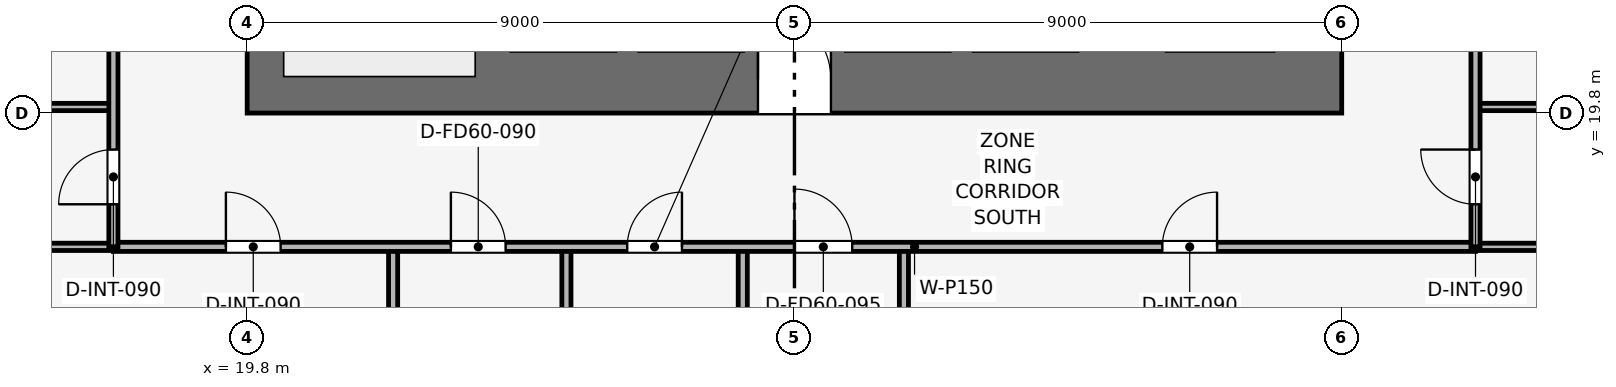
"""IFC4 building model, lengths in metres.
Left out: names, types, materials, properties, quantities, classifications, styles, units other than length and angle.
Written with IfcOpenShell. Run it as: python <this file> out.ifc"""

import sys

from ifc_helpers import new_model, si_unit, direction, frame, frame_2d, origin, place, context, subcontext, project, spatial, rectangle, extrude, element, fill, save


model = new_model("IFC4")
c1 = context("Model", 3, precision=1e-05, world=origin(), true_north=direction((0.0, 1.0)))
c2 = subcontext(c1, "Body", "Model", "MODEL_VIEW")
j1 = project(units=[si_unit("LENGTHUNIT", "METRE"), si_unit("PLANEANGLEUNIT", "RADIAN")], contexts=[c1])
p1 = place(None, origin())
s1 = spatial("IfcSite", under=j1, at=p1, CompositionType="ELEMENT")
p2 = place(p1, origin())
s2 = spatial("IfcBuilding", under=s1, at=p2, CompositionType="ELEMENT")
p3 = place(p2, frame((0.0, 0.0, 65.1)))
s3 = spatial("IfcBuildingStorey", under=s2, at=p3, CompositionType="ELEMENT", Elevation=65.1)
p4 = place(p3, frame((19.8, 20.35, 0.0), z_axis=(0.0, 0.0, 1.0), x_axis=(1.0, 0.0, 0.0)))
e1 = element("IfcWall", 1, at=p4, inside=s3, PredefinedType="SHEAR", context=c2, shape_type="SweptSolid", body=[
    extrude(rectangle(XDim=18.0, YDim=1.1, at=frame_2d((9.0, 0.0))), origin(), (0.0, 0.0, 1.0), 3.9),
])
p5 = place(p4, frame((8.4, 0.0, 0.0)))
e2 = element("IfcOpeningElement", 2, at=p5, cuts=e1, PredefinedType="OPENING", context=c2, shape_type="SweptSolid", body=[
    extrude(rectangle(XDim=1.2, YDim=2.2, at=frame_2d((0.6, 1.1))), frame((0.0, 0.56, 0.0), z_axis=(0.0, -1.0, 0.0), x_axis=(1.0, 0.0, 0.0)), (0.0, 0.0, 1.0), 1.12),
])
p6 = place(p3, frame((22.2, 1.03, 0.0), z_axis=(0.0, 0.0, 1.0), x_axis=(0.0, 1.0, 0.0)))
e3 = element("IfcWall", 3, at=p6, inside=s3, PredefinedType="PARTITIONING", context=c2, shape_type="SweptSolid", body=[
    extrude(rectangle(XDim=16.57, YDim=0.15, at=frame_2d((8.285, 0.0))), origin(), (0.0, 0.0, 1.0), 2.935),
])
p7 = place(p6, frame((6.235, 0.0, 0.0)))
e4 = element("IfcOpeningElement", 4, at=p7, cuts=e3, PredefinedType="OPENING", context=c2, shape_type="SweptSolid", body=[
    extrude(rectangle(XDim=0.9, YDim=2.1, at=frame_2d((0.45, 1.05))), frame((0.0, 0.085, 0.0), z_axis=(0.0, -1.0, 0.0), x_axis=(1.0, 0.0, 0.0)), (0.0, 0.0, 1.0), 0.17),
])
p8 = place(p3, frame((30.6, 1.03, 0.0), z_axis=(0.0, 0.0, 1.0), x_axis=(0.0, 1.0, 0.0)))
e5 = element("IfcWall", 5, at=p8, inside=s3, PredefinedType="PARTITIONING", context=c2, shape_type="SweptSolid", body=[
    extrude(rectangle(XDim=16.57, YDim=0.15, at=frame_2d((8.285, 0.0))), origin(), (0.0, 0.0, 1.0), 2.935),
])
for number, where, z_axis, x_axis in (
    (6, (25.05, 14.4, 0.0), (0.0, 0.0, 1.0), (0.0, 1.0, 0.0)),
    (7, (27.95, 14.4, 0.0), (0.0, 0.0, 1.0), (0.0, 1.0, 0.0)),
):
    element("IfcWall", number, at=place(p3, frame(where, z_axis=z_axis, x_axis=x_axis)), inside=s3, PredefinedType="PARTITIONING", context=c2, shape_type="SweptSolid", body=[
        extrude(rectangle(XDim=3.2, YDim=0.15, at=frame_2d((1.6, 0.0))), origin(), (0.0, 0.0, 1.0), 3.65),
    ])
for number, where, z_axis, x_axis in (
    (8, (1.03, 17.6, 0.0), (0.0, 0.0, 1.0), (1.0, 0.0, 0.0)),
    (9, (40.0, 17.6, 0.0), (0.0, 0.0, 1.0), (1.0, 0.0, 0.0)),
    (10, (1.03, 19.9, 0.0), (0.0, 0.0, 1.0), (1.0, 0.0, 0.0)),
    (11, (40.0, 19.9, 0.0), (0.0, 0.0, 1.0), (1.0, 0.0, 0.0)),
):
    element("IfcWall", number, at=place(p3, frame(where, z_axis=z_axis, x_axis=x_axis)), inside=s3, PredefinedType="PARTITIONING", context=c2, shape_type="SweptSolid", body=[
        extrude(rectangle(XDim=16.57, YDim=0.12, at=frame_2d((8.285, 0.0))), origin(), (0.0, 0.0, 1.0), 2.935),
    ])
p9 = place(p3, frame((17.6, 17.6, 0.0), z_axis=(0.0, 0.0, 1.0), x_axis=(1.0, 0.0, 0.0)))
e12 = element("IfcWall", 12, at=p9, inside=s3, PredefinedType="PARTITIONING", context=c2, shape_type="SweptSolid", body=[
    extrude(rectangle(XDim=22.4, YDim=0.15, at=frame_2d((11.2, 0.0))), origin(), (0.0, 0.0, 1.0), 3.085),
])
p10 = place(p9, frame((1.85, 0.0, 0.0)))
e13 = element("IfcOpeningElement", 13, at=p10, cuts=e12, PredefinedType="OPENING", context=c2, shape_type="SweptSolid", body=[
    extrude(rectangle(XDim=0.9, YDim=2.1, at=frame_2d((0.45, 1.05))), frame((0.0, 0.085, 0.0), z_axis=(0.0, -1.0, 0.0), x_axis=(1.0, 0.0, 0.0)), (0.0, 0.0, 1.0), 0.17),
])
p11 = place(p9, frame((5.55, 0.0, 0.0)))
e14 = element("IfcOpeningElement", 14, at=p11, cuts=e12, PredefinedType="OPENING", context=c2, shape_type="SweptSolid", body=[
    extrude(rectangle(XDim=0.9, YDim=2.1, at=frame_2d((0.45, 1.05))), frame((0.0, 0.085, 0.0), z_axis=(0.0, -1.0, 0.0), x_axis=(1.0, 0.0, 0.0)), (0.0, 0.0, 1.0), 0.17),
])
p12 = place(p9, frame((8.45, 0.0, 0.0)))
e15 = element("IfcOpeningElement", 15, at=p12, cuts=e12, PredefinedType="OPENING", context=c2, shape_type="SweptSolid", body=[
    extrude(rectangle(XDim=0.9, YDim=2.1, at=frame_2d((0.45, 1.05))), frame((0.0, 0.085, 0.0), z_axis=(0.0, -1.0, 0.0), x_axis=(1.0, 0.0, 0.0)), (0.0, 0.0, 1.0), 0.17),
])
p13 = place(p9, frame((11.2, 0.0, 0.0)))
e16 = element("IfcOpeningElement", 16, at=p13, cuts=e12, PredefinedType="OPENING", context=c2, shape_type="SweptSolid", body=[
    extrude(rectangle(XDim=0.95, YDim=2.1, at=frame_2d((0.475, 1.05))), frame((0.0, 0.085, 0.0), z_axis=(0.0, -1.0, 0.0), x_axis=(1.0, 0.0, 0.0)), (0.0, 0.0, 1.0), 0.17),
])
p14 = place(p9, frame((17.25, 0.0, 0.0)))
e17 = element("IfcOpeningElement", 17, at=p14, cuts=e12, PredefinedType="OPENING", context=c2, shape_type="SweptSolid", body=[
    extrude(rectangle(XDim=0.9, YDim=2.1, at=frame_2d((0.45, 1.05))), frame((0.0, 0.085, 0.0), z_axis=(0.0, -1.0, 0.0), x_axis=(1.0, 0.0, 0.0)), (0.0, 0.0, 1.0), 0.17),
])
p15 = place(p3, frame((17.6, 17.6, 0.0), z_axis=(0.0, 0.0, 1.0), x_axis=(0.0, 1.0, 0.0)))
e18 = element("IfcWall", 18, at=p15, inside=s3, PredefinedType="PARTITIONING", context=c2, shape_type="SweptSolid", body=[
    extrude(rectangle(XDim=22.4, YDim=0.15, at=frame_2d((11.2, 0.0))), origin(), (0.0, 0.0, 1.0), 3.085),
])
p16 = place(p15, frame((0.7, 0.0, 0.0)))
e19 = element("IfcOpeningElement", 19, at=p16, cuts=e18, PredefinedType="OPENING", context=c2, shape_type="SweptSolid", body=[
    extrude(rectangle(XDim=0.9, YDim=2.1, at=frame_2d((0.45, 1.05))), frame((0.0, 0.085, 0.0), z_axis=(0.0, -1.0, 0.0), x_axis=(1.0, 0.0, 0.0)), (0.0, 0.0, 1.0), 0.17),
])
p17 = place(p15, frame((6.365, 0.0, 0.0)))
e20 = element("IfcOpeningElement", 20, at=p17, cuts=e18, PredefinedType="OPENING", context=c2, shape_type="SweptSolid", body=[
    extrude(rectangle(XDim=0.9, YDim=2.1, at=frame_2d((0.45, 1.05))), frame((0.0, 0.085, 0.0), z_axis=(0.0, -1.0, 0.0), x_axis=(1.0, 0.0, 0.0)), (0.0, 0.0, 1.0), 0.17),
])
p18 = place(p15, frame((16.415, 0.0, 0.0)))
e21 = element("IfcOpeningElement", 21, at=p18, cuts=e18, PredefinedType="OPENING", context=c2, shape_type="SweptSolid", body=[
    extrude(rectangle(XDim=0.9, YDim=2.1, at=frame_2d((0.45, 1.05))), frame((0.0, 0.085, 0.0), z_axis=(0.0, -1.0, 0.0), x_axis=(1.0, 0.0, 0.0)), (0.0, 0.0, 1.0), 0.17),
])
p19 = place(p3, frame((40.0, 17.6, 0.0), z_axis=(0.0, 0.0, 1.0), x_axis=(0.0, 1.0, 0.0)))
e22 = element("IfcWall", 22, at=p19, inside=s3, PredefinedType="PARTITIONING", context=c2, shape_type="SweptSolid", body=[
    extrude(rectangle(XDim=22.4, YDim=0.15, at=frame_2d((11.2, 0.0))), origin(), (0.0, 0.0, 1.0), 3.085),
])
p20 = place(p19, frame((0.7, 0.0, 0.0)))
e23 = element("IfcOpeningElement", 23, at=p20, cuts=e22, PredefinedType="OPENING", context=c2, shape_type="SweptSolid", body=[
    extrude(rectangle(XDim=0.9, YDim=2.1, at=frame_2d((0.45, 1.05))), frame((0.0, 0.085, 0.0), z_axis=(0.0, -1.0, 0.0), x_axis=(1.0, 0.0, 0.0)), (0.0, 0.0, 1.0), 0.17),
])
p21 = place(p19, frame((4.699, 0.0, 0.0)))
e24 = element("IfcOpeningElement", 24, at=p21, cuts=e22, PredefinedType="OPENING", context=c2, shape_type="SweptSolid", body=[
    extrude(rectangle(XDim=0.9, YDim=2.1, at=frame_2d((0.45, 1.05))), frame((0.0, 0.085, 0.0), z_axis=(0.0, -1.0, 0.0), x_axis=(1.0, 0.0, 0.0)), (0.0, 0.0, 1.0), 0.17),
])
p22 = place(p19, frame((10.692, 0.0, 0.0)))
e25 = element("IfcOpeningElement", 25, at=p22, cuts=e22, PredefinedType="OPENING", context=c2, shape_type="SweptSolid", body=[
    extrude(rectangle(XDim=0.9, YDim=2.1, at=frame_2d((0.45, 1.05))), frame((0.0, 0.085, 0.0), z_axis=(0.0, -1.0, 0.0), x_axis=(1.0, 0.0, 0.0)), (0.0, 0.0, 1.0), 0.17),
])
p23 = place(p19, frame((17.892, 0.0, 0.0)))
e26 = element("IfcOpeningElement", 26, at=p23, cuts=e22, PredefinedType="OPENING", context=c2, shape_type="SweptSolid", body=[
    extrude(rectangle(XDim=0.9, YDim=2.1, at=frame_2d((0.45, 1.05))), frame((0.0, 0.085, 0.0), z_axis=(0.0, -1.0, 0.0), x_axis=(1.0, 0.0, 0.0)), (0.0, 0.0, 1.0), 0.17),
])
p24 = place(p10, origin())
e27 = element("IfcDoor", 27, at=p24, inside=s3, OperationType="SINGLE_SWING_LEFT", PredefinedType="DOOR", context=c2, shape_type="SweptSolid", body=[
    extrude(rectangle(XDim=0.9, YDim=2.1, at=frame_2d((0.45, 1.05))), frame((0.0, 0.025, 0.0), z_axis=(0.0, -1.0, 0.0), x_axis=(1.0, 0.0, 0.0)), (0.0, 0.0, 1.0), 0.05),
])
fill(e13, e27)
p25 = place(p11, origin())
e28 = element("IfcDoor", 28, at=p25, inside=s3, OperationType="SINGLE_SWING_LEFT", PredefinedType="DOOR", context=c2, shape_type="SweptSolid", body=[
    extrude(rectangle(XDim=0.9, YDim=2.1, at=frame_2d((0.45, 1.05))), frame((0.0, 0.025, 0.0), z_axis=(0.0, -1.0, 0.0), x_axis=(1.0, 0.0, 0.0)), (0.0, 0.0, 1.0), 0.05),
])
fill(e14, e28)
p26 = place(p12, origin())
e29 = element("IfcDoor", 29, at=p26, inside=s3, OperationType="SINGLE_SWING_RIGHT", PredefinedType="DOOR", context=c2, shape_type="SweptSolid", body=[
    extrude(rectangle(XDim=0.9, YDim=2.1, at=frame_2d((0.45, 1.05))), frame((0.0, 0.025, 0.0), z_axis=(0.0, -1.0, 0.0), x_axis=(1.0, 0.0, 0.0)), (0.0, 0.0, 1.0), 0.05),
])
fill(e15, e29)
p27 = place(p13, origin())
e30 = element("IfcDoor", 30, at=p27, inside=s3, OperationType="SINGLE_SWING_LEFT", PredefinedType="DOOR", context=c2, shape_type="SweptSolid", body=[
    extrude(rectangle(XDim=0.95, YDim=2.1, at=frame_2d((0.475, 1.05))), frame((0.0, 0.025, 0.0), z_axis=(0.0, -1.0, 0.0), x_axis=(1.0, 0.0, 0.0)), (0.0, 0.0, 1.0), 0.05),
])
fill(e16, e30)
p28 = place(p14, origin())
e31 = element("IfcDoor", 31, at=p28, inside=s3, OperationType="SINGLE_SWING_RIGHT", PredefinedType="DOOR", context=c2, shape_type="SweptSolid", body=[
    extrude(rectangle(XDim=0.9, YDim=2.1, at=frame_2d((0.45, 1.05))), frame((0.0, 0.025, 0.0), z_axis=(0.0, -1.0, 0.0), x_axis=(1.0, 0.0, 0.0)), (0.0, 0.0, 1.0), 0.05),
])
fill(e17, e31)
p29 = place(p16, origin())
e32 = element("IfcDoor", 32, at=p29, inside=s3, OperationType="SINGLE_SWING_LEFT", PredefinedType="DOOR", context=c2, shape_type="SweptSolid", body=[
    extrude(rectangle(XDim=0.9, YDim=2.1, at=frame_2d((0.45, 1.05))), frame((0.0, 0.025, 0.0), z_axis=(0.0, -1.0, 0.0), x_axis=(1.0, 0.0, 0.0)), (0.0, 0.0, 1.0), 0.05),
])
fill(e19, e32)
p30 = place(p20, origin())
e33 = element("IfcDoor", 33, at=p30, inside=s3, OperationType="SINGLE_SWING_RIGHT", PredefinedType="DOOR", context=c2, shape_type="SweptSolid", body=[
    extrude(rectangle(XDim=0.9, YDim=2.1, at=frame_2d((0.45, 1.05))), frame((0.0, 0.025, 0.0), z_axis=(0.0, -1.0, 0.0), x_axis=(1.0, 0.0, 0.0)), (0.0, 0.0, 1.0), 0.05),
])
fill(e23, e33)
p31 = place(p5, origin())
e34 = element("IfcDoor", 34, at=p31, inside=s3, OperationType="SINGLE_SWING_LEFT", PredefinedType="DOOR", context=c2, shape_type="SweptSolid", body=[
    extrude(rectangle(XDim=1.2, YDim=2.2, at=frame_2d((0.6, 1.1))), frame((0.0, 0.025, 0.0), z_axis=(0.0, -1.0, 0.0), x_axis=(1.0, 0.0, 0.0)), (0.0, 0.0, 1.0), 0.05),
])
fill(e2, e34)
save(model, sys.argv[1])
